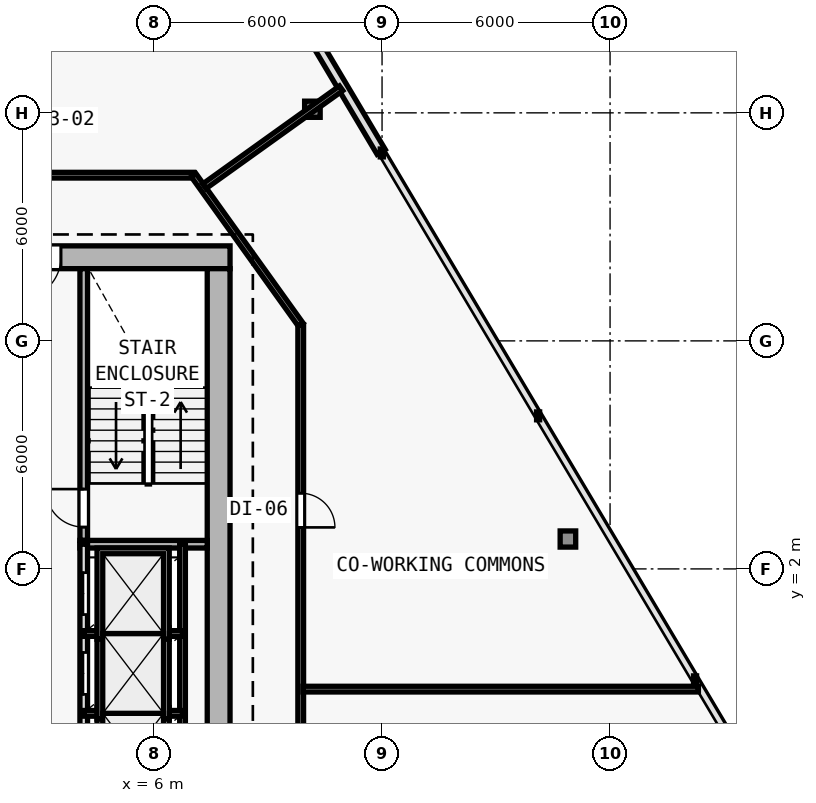
"""IFC4 building model, lengths in metres.
Left out: names, types, materials, properties, quantities, classifications, styles, units other than length and angle.
Written with IfcOpenShell. Run it as: python <this file> out.ifc"""

import sys

from ifc_helpers import new_model, si_unit, direction, frame, frame_2d, origin, origin_2d, place, context, subcontext, project, spatial, rectangle, i_section, extrude, element, fill, save


model = new_model("IFC4")
c1 = context("Model", 3, precision=1e-05, world=origin(), true_north=direction((0.0, 1.0)))
c2 = subcontext(c1, "Body", "Model", "MODEL_VIEW")
j1 = project(units=[si_unit("LENGTHUNIT", "METRE"), si_unit("PLANEANGLEUNIT", "RADIAN")], contexts=[c1])
p1 = place(None, origin())
s1 = spatial("IfcSite", under=j1, at=p1, CompositionType="ELEMENT")
p2 = place(p1, origin())
s2 = spatial("IfcBuilding", under=s1, at=p2, CompositionType="ELEMENT")
p3 = place(p2, frame((0.0, 0.0, 89.7)))
s3 = spatial("IfcBuildingStorey", under=s2, at=p3, CompositionType="ELEMENT", Elevation=89.7)
for number, where, z_axis, x_axis in (
    (1, (7.7, 10.2, 0.0), (0.0, 0.0, 1.0), (1.0, 0.0, 0.0)),
    (2, (7.7, 0.4, 0.0), (0.0, 0.0, 1.0), (1.0, 0.0, 0.0)),
):
    element("IfcColumn", number, at=place(p3, frame(where, z_axis=z_axis, x_axis=x_axis)), inside=s3, PredefinedType="COLUMN", context=c2, shape_type="SweptSolid", body=[
        extrude(i_section(OverallWidth=0.409, OverallDepth=0.425, WebThickness=0.021, FlangeThickness=0.034, FilletRadius=0.015, at=origin_2d()), origin(), (0.0, 0.0, 1.0), 3.6),
    ])
p4 = place(p3, frame((16.891, 2.787, 0.006), z_axis=(-0.018907326549, 0.00952167524, 0.999775900241), x_axis=(-0.449781931574, -0.893138406984, 0.0)))
e3 = element("IfcColumn", 3, at=p4, inside=s3, PredefinedType="COLUMN", context=c2, shape_type="SweptSolid", body=[
    extrude(i_section(OverallWidth=0.409, OverallDepth=0.425, WebThickness=0.021, FlangeThickness=0.034, FilletRadius=0.015, at=origin_2d()), origin(), (0.0, 0.0, 1.0), 3.59),
])
p5 = place(p3, frame((10.167, 14.095, 0.006), z_axis=(-0.011699842352, -0.002516826552, 0.999928387072), x_axis=(0.210305364179, -0.977635746993, 0.0)))
e4 = element("IfcColumn", 4, at=p5, inside=s3, PredefinedType="COLUMN", context=c2, shape_type="SweptSolid", body=[
    extrude(i_section(OverallWidth=0.409, OverallDepth=0.425, WebThickness=0.021, FlangeThickness=0.034, FilletRadius=0.015, at=origin_2d()), origin(), (0.0, 0.0, 1.0), 3.589),
])
p6 = place(p3, frame((6.172, 22.734, 0.0), z_axis=(0.0, 0.0, 1.0), x_axis=(0.511105869751, -0.859517765905, 0.0)))
e5 = element("IfcWall", 5, at=p6, inside=s3, PredefinedType="SOLIDWALL", context=c2, shape_type="SweptSolid", body=[
    extrude(rectangle(XDim=11.357, YDim=0.25, at=frame_2d((5.678, 0.0))), origin(), (0.0, 0.0, 1.0), 3.35),
])
p7 = place(p6, frame((4.928, 0.0, 0.62)))
e6 = element("IfcOpeningElement", 6, at=p7, cuts=e5, PredefinedType="OPENING", context=c2, shape_type="SweptSolid", body=[
    extrude(rectangle(XDim=1.5, YDim=2.0, at=frame_2d((0.75, 1.0))), frame((0.0, 0.135, 0.0), z_axis=(0.0, -1.0, 0.0), x_axis=(1.0, 0.0, 0.0)), (0.0, 0.0, 1.0), 0.27),
])
p8 = place(p3, frame((8.0, 10.2, 0.0), z_axis=(0.0, 0.0, 1.0), x_axis=(-1.0, 0.0, 0.0)))
e7 = element("IfcWall", 7, at=p8, inside=s3, PredefinedType="SHEAR", context=c2, shape_type="SweptSolid", body=[
    extrude(rectangle(XDim=16.0, YDim=0.6, at=frame_2d((8.0, 0.0))), origin(), (0.0, 0.0, 1.0), 3.35),
])
p9 = place(p8, frame((4.45, 0.0, 0.0)))
e8 = element("IfcOpeningElement", 8, at=p9, cuts=e7, PredefinedType="OPENING", context=c2, shape_type="SweptSolid", body=[
    extrude(rectangle(XDim=1.1, YDim=2.15, at=frame_2d((0.55, 1.075))), frame((0.0, 0.31, 0.0), z_axis=(0.0, -1.0, 0.0), x_axis=(1.0, 0.0, 0.0)), (0.0, 0.0, 1.0), 0.62),
])
p10 = place(p3, frame((7.7, 9.9, 0.0), z_axis=(0.0, 0.0, 1.0), x_axis=(0.0, -1.0, 0.0)))
e9 = element("IfcWall", 9, at=p10, inside=s3, PredefinedType="SHEAR", context=c2, shape_type="SweptSolid", body=[
    extrude(rectangle(XDim=19.0, YDim=0.6, at=frame_2d((9.5, 0.0))), origin(), (0.0, 0.0, 1.0), 3.35),
])
p11 = place(p3, frame((4.15, 2.75, 0.0), z_axis=(0.0, 0.0, 1.0), x_axis=(0.0, 1.0, 0.0)))
e10 = element("IfcWall", 10, at=p11, inside=s3, PredefinedType="SOLIDWALL", context=c2, shape_type="SweptSolid", body=[
    extrude(rectangle(XDim=7.15, YDim=0.2, at=frame_2d((3.575, 0.0))), origin(), (0.0, 0.0, 1.0), 3.35),
])
p12 = place(p11, frame((0.35, 0.0, 0.0)))
e11 = element("IfcOpeningElement", 11, at=p12, cuts=e10, PredefinedType="OPENING", context=c2, shape_type="SweptSolid", body=[
    extrude(rectangle(XDim=1.0, YDim=2.15, at=frame_2d((0.5, 1.075))), frame((0.0, 0.11, 0.0), z_axis=(0.0, -1.0, 0.0), x_axis=(1.0, 0.0, 0.0)), (0.0, 0.0, 1.0), 0.22),
])
p13 = place(p3, frame((4.05, 2.65, 0.0), z_axis=(0.0, 0.0, 1.0), x_axis=(1.0, 0.0, 0.0)))
e12 = element("IfcWall", 12, at=p13, inside=s3, PredefinedType="SOLIDWALL", context=c2, shape_type="SweptSolid", body=[
    extrude(rectangle(XDim=3.35, YDim=0.2, at=frame_2d((1.675, 0.0))), origin(), (0.0, 0.0, 1.0), 3.35),
])
p14 = place(p3, frame((4.15, -6.05, 0.0), z_axis=(0.0, 0.0, 1.0), x_axis=(0.0, 1.0, 0.0)))
e13 = element("IfcWall", 13, at=p14, inside=s3, PredefinedType="SOLIDWALL", context=c2, shape_type="SweptSolid", body=[
    extrude(rectangle(XDim=8.7, YDim=0.2, at=frame_2d((4.35, 0.0))), origin(), (0.0, 0.0, 1.0), 3.35),
])
p15 = place(p14, frame((0.55, 0.0, 0.0)))
e14 = element("IfcOpeningElement", 14, at=p15, cuts=e13, PredefinedType="OPENING", context=c2, shape_type="SweptSolid", body=[
    extrude(rectangle(XDim=1.1, YDim=2.15, at=frame_2d((0.55, 1.075))), frame((0.0, 0.11, 0.0), z_axis=(0.0, -1.0, 0.0), x_axis=(1.0, 0.0, 0.0)), (0.0, 0.0, 1.0), 0.22),
])
p16 = place(p14, frame((2.65, 0.0, 0.0)))
e15 = element("IfcOpeningElement", 15, at=p16, cuts=e13, PredefinedType="OPENING", context=c2, shape_type="SweptSolid", body=[
    extrude(rectangle(XDim=1.1, YDim=2.15, at=frame_2d((0.55, 1.075))), frame((0.0, 0.11, 0.0), z_axis=(0.0, -1.0, 0.0), x_axis=(1.0, 0.0, 0.0)), (0.0, 0.0, 1.0), 0.22),
])
p17 = place(p14, frame((4.75, 0.0, 0.0)))
e16 = element("IfcOpeningElement", 16, at=p17, cuts=e13, PredefinedType="OPENING", context=c2, shape_type="SweptSolid", body=[
    extrude(rectangle(XDim=1.1, YDim=2.15, at=frame_2d((0.55, 1.075))), frame((0.0, 0.11, 0.0), z_axis=(0.0, -1.0, 0.0), x_axis=(1.0, 0.0, 0.0)), (0.0, 0.0, 1.0), 0.22),
])
p18 = place(p14, frame((6.85, 0.0, 0.0)))
e17 = element("IfcOpeningElement", 17, at=p18, cuts=e13, PredefinedType="OPENING", context=c2, shape_type="SweptSolid", body=[
    extrude(rectangle(XDim=1.1, YDim=2.15, at=frame_2d((0.55, 1.075))), frame((0.0, 0.11, 0.0), z_axis=(0.0, -1.0, 0.0), x_axis=(1.0, 0.0, 0.0)), (0.0, 0.0, 1.0), 0.22),
])
p19 = place(p3, frame((6.75, -6.05, 0.0), z_axis=(0.0, 0.0, 1.0), x_axis=(0.0, 1.0, 0.0)))
e18 = element("IfcWall", 18, at=p19, inside=s3, PredefinedType="PARTITIONING", context=c2, shape_type="SweptSolid", body=[
    extrude(rectangle(XDim=8.7, YDim=0.15, at=frame_2d((4.35, 0.0))), origin(), (0.0, 0.0, 1.0), 3.35),
])
for number, where, z_axis, x_axis in (
    (19, (4.15, -1.8, 0.0), (0.0, 0.0, 1.0), (1.0, 0.0, 0.0)),
    (20, (4.15, 0.3, 0.0), (0.0, 0.0, 1.0), (1.0, 0.0, 0.0)),
):
    element("IfcWall", number, at=place(p3, frame(where, z_axis=z_axis, x_axis=x_axis)), inside=s3, PredefinedType="PARTITIONING", context=c2, shape_type="SweptSolid", body=[
        extrude(rectangle(XDim=2.6, YDim=0.15, at=frame_2d((1.3, 0.0))), origin(), (0.0, 0.0, 1.0), 3.35),
    ])
p20 = place(p3, frame((-7.041, 12.36, 0.0), z_axis=(0.0, 0.0, 1.0), x_axis=(1.0, 0.0, 0.0)))
e21 = element("IfcWall", 21, at=p20, inside=s3, PredefinedType="PARTITIONING", context=c2, shape_type="SweptSolid", body=[
    extrude(rectangle(XDim=14.082, YDim=0.15, at=frame_2d((7.041, 0.0))), origin(), (0.0, 0.0, 1.0), 3.35),
])
p21 = place(p20, frame((6.591, 0.0, 0.0)))
e22 = element("IfcOpeningElement", 22, at=p21, cuts=e21, PredefinedType="OPENING", context=c2, shape_type="SweptSolid", body=[
    extrude(rectangle(XDim=0.9, YDim=2.1, at=frame_2d((0.45, 1.05))), frame((0.0, 0.085, 0.0), z_axis=(0.0, -1.0, 0.0), x_axis=(1.0, 0.0, 0.0)), (0.0, 0.0, 1.0), 0.17),
])
p22 = place(p3, frame((7.041, 12.36, 0.0), z_axis=(0.0, 0.0, 1.0), x_axis=(0.582449511476, -0.812866881218, 0.0)))
e23 = element("IfcWall", 23, at=p22, inside=s3, PredefinedType="PARTITIONING", context=c2, shape_type="SweptSolid", body=[
    extrude(rectangle(XDim=4.84, YDim=0.15, at=frame_2d((2.42, 0.0))), origin(), (0.0, 0.0, 1.0), 2.875),
])
p23 = place(p3, frame((9.86, 8.426, 0.0), z_axis=(0.0, 0.0, 1.0), x_axis=(0.0, -1.0, 0.0)))
e24 = element("IfcWall", 24, at=p23, inside=s3, PredefinedType="PARTITIONING", context=c2, shape_type="SweptSolid", body=[
    extrude(rectangle(XDim=19.986, YDim=0.15, at=frame_2d((9.993, 0.0))), origin(), (0.0, 0.0, 1.0), 2.609),
])
p24 = place(p23, frame((14.248, 0.0, 0.0)))
e25 = element("IfcOpeningElement", 25, at=p24, cuts=e24, PredefinedType="OPENING", context=c2, shape_type="SweptSolid", body=[
    extrude(rectangle(XDim=0.9, YDim=2.1, at=frame_2d((0.45, 1.05))), frame((0.0, 0.085, 0.0), z_axis=(0.0, -1.0, 0.0), x_axis=(1.0, 0.0, 0.0)), (0.0, 0.0, 1.0), 0.17),
])
p25 = place(p23, frame((4.434, 0.0, 0.0)))
e26 = element("IfcOpeningElement", 26, at=p25, cuts=e24, PredefinedType="OPENING", context=c2, shape_type="SweptSolid", body=[
    extrude(rectangle(XDim=0.9, YDim=2.1, at=frame_2d((0.45, 1.05))), frame((0.0, 0.085, 0.0), z_axis=(0.0, -1.0, 0.0), x_axis=(1.0, 0.0, 0.0)), (0.0, 0.0, 1.0), 0.17),
])
p26 = place(p3, frame((7.324, 12.068, 0.0), z_axis=(0.0, 0.0, 1.0), x_axis=(0.8128980562, 0.582406001193, 0.0)))
e27 = element("IfcWall", 27, at=p26, inside=s3, PredefinedType="PARTITIONING", context=c2, shape_type="SweptSolid", body=[
    extrude(rectangle(XDim=4.427, YDim=0.15, at=frame_2d((2.214, 0.0))), origin(), (0.0, 0.0, 1.0), 2.835),
])
p27 = place(p3, frame((9.92, -1.163, 0.0), z_axis=(0.0, 0.0, 1.0), x_axis=(1.0, 0.0, 0.0)))
e28 = element("IfcWall", 28, at=p27, inside=s3, PredefinedType="PARTITIONING", context=c2, shape_type="SweptSolid", body=[
    extrude(rectangle(XDim=10.404, YDim=0.15, at=frame_2d((5.202, 0.0))), origin(), (0.0, 0.0, 1.0), 2.825),
])
p28 = place(p9, origin())
e29 = element("IfcDoor", 29, at=p28, inside=s3, OperationType="SINGLE_SWING_RIGHT", PredefinedType="DOOR", context=c2, shape_type="SweptSolid", body=[
    extrude(rectangle(XDim=1.1, YDim=2.15, at=frame_2d((0.55, 1.075))), frame((0.0, 0.025, 0.0), z_axis=(0.0, -1.0, 0.0), x_axis=(1.0, 0.0, 0.0)), (0.0, 0.0, 1.0), 0.05),
])
fill(e8, e29)
p29 = place(p12, origin())
e30 = element("IfcDoor", 30, at=p29, inside=s3, OperationType="SINGLE_SWING_RIGHT", PredefinedType="DOOR", context=c2, shape_type="SweptSolid", body=[
    extrude(rectangle(XDim=1.0, YDim=2.15, at=frame_2d((0.5, 1.075))), frame((0.0, 0.025, 0.0), z_axis=(0.0, -1.0, 0.0), x_axis=(1.0, 0.0, 0.0)), (0.0, 0.0, 1.0), 0.05),
])
fill(e11, e30)
p30 = place(p17, origin())
e31 = element("IfcDoor", 31, at=p30, inside=s3, OperationType="DOUBLE_DOOR_SLIDING", PredefinedType="DOOR", context=c2, shape_type="SweptSolid", body=[
    extrude(rectangle(XDim=1.1, YDim=2.15, at=frame_2d((0.55, 1.075))), frame((0.0, 0.025, 0.0), z_axis=(0.0, -1.0, 0.0), x_axis=(1.0, 0.0, 0.0)), (0.0, 0.0, 1.0), 0.05),
])
fill(e16, e31)
p31 = place(p18, origin())
e32 = element("IfcDoor", 32, at=p31, inside=s3, OperationType="DOUBLE_DOOR_SLIDING", PredefinedType="DOOR", context=c2, shape_type="SweptSolid", body=[
    extrude(rectangle(XDim=1.1, YDim=2.15, at=frame_2d((0.55, 1.075))), frame((0.0, 0.025, 0.0), z_axis=(0.0, -1.0, 0.0), x_axis=(1.0, 0.0, 0.0)), (0.0, 0.0, 1.0), 0.05),
])
fill(e17, e32)
p32 = place(p25, origin())
e33 = element("IfcDoor", 33, at=p32, inside=s3, OperationType="SINGLE_SWING_RIGHT", PredefinedType="DOOR", context=c2, shape_type="SweptSolid", body=[
    extrude(rectangle(XDim=0.9, YDim=2.1, at=frame_2d((0.45, 1.05))), frame((0.0, 0.025, 0.0), z_axis=(0.0, -1.0, 0.0), x_axis=(1.0, 0.0, 0.0)), (0.0, 0.0, 1.0), 0.05),
])
fill(e26, e33)
save(model, sys.argv[1])
